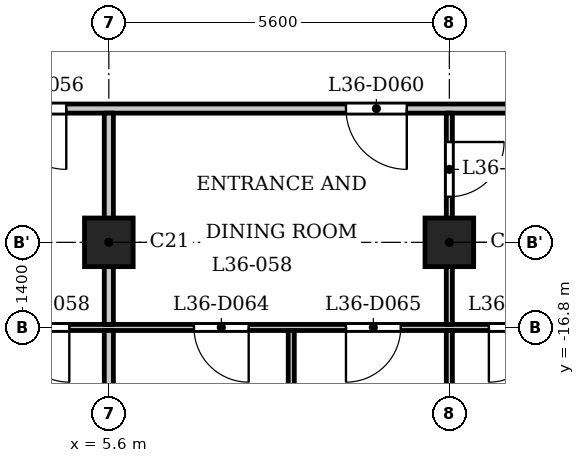
"""IFC4 building model, lengths in metres.
Left out: names, types, materials, properties, quantities, classifications, styles, units other than length and angle.
Written with IfcOpenShell. Run it as: python <this file> out.ifc"""

import sys

from ifc_helpers import new_model, si_unit, direction, frame, frame_2d, origin, origin_2d, place, context, subcontext, project, spatial, rectangle, extrude, element, fill, save


model = new_model("IFC4")
c1 = context("Model", 3, precision=1e-05, world=origin(), true_north=direction((0.0, 1.0)))
c2 = subcontext(c1, "Body", "Model", "MODEL_VIEW")
j1 = project(units=[si_unit("LENGTHUNIT", "METRE"), si_unit("PLANEANGLEUNIT", "RADIAN")], contexts=[c1])
p1 = place(None, origin())
s1 = spatial("IfcSite", under=j1, at=p1, CompositionType="ELEMENT")
p2 = place(p1, origin())
s2 = spatial("IfcBuilding", under=s1, at=p2, CompositionType="ELEMENT")
p3 = place(p2, frame((0.0, 0.0, 143.1)))
s3 = spatial("IfcBuildingStorey", under=s2, at=p3, CompositionType="ELEMENT", Elevation=143.1)
for number, where, z_axis, x_axis in (
    (1, (5.6, -15.4, 0.0), (0.0, 0.0, 1.0), (1.0, 0.0, 0.0)),
    (2, (11.2, -15.4, 0.0), (0.0, 0.0, 1.0), (1.0, 0.0, 0.0)),
):
    element("IfcColumn", number, at=place(p3, frame(where, z_axis=z_axis, x_axis=x_axis)), inside=s3, PredefinedType="COLUMN", context=c2, shape_type="SweptSolid", body=[
        extrude(rectangle(XDim=0.8, YDim=0.8, at=origin_2d()), origin(), (0.0, 0.0, 1.0), 3.5),
    ])
p4 = place(p3, frame((-16.725, -16.8, 0.0), z_axis=(0.0, 0.0, 1.0), x_axis=(1.0, 0.0, 0.0)))
e3 = element("IfcWall", 3, at=p4, inside=s3, PredefinedType="PARTITIONING", context=c2, shape_type="SweptSolid", body=[
    extrude(rectangle(XDim=33.45, YDim=0.1, at=frame_2d((16.725, 0.0))), origin(), (0.0, 0.0, 1.0), 3.2),
])
p5 = place(p4, frame((0.575, 0.0, 0.0)))
e4 = element("IfcOpeningElement", 4, at=p5, cuts=e3, PredefinedType="OPENING", context=c2, shape_type="SweptSolid", body=[
    extrude(rectangle(XDim=0.8, YDim=2.1, at=frame_2d((0.4, 1.05))), frame((0.0, 0.06, 0.0), z_axis=(0.0, -1.0, 0.0), x_axis=(1.0, 0.0, 0.0)), (0.0, 0.0, 1.0), 0.12),
])
p6 = place(p4, frame((6.175, 0.0, 0.0)))
e5 = element("IfcOpeningElement", 5, at=p6, cuts=e3, PredefinedType="OPENING", context=c2, shape_type="SweptSolid", body=[
    extrude(rectangle(XDim=0.9, YDim=2.1, at=frame_2d((0.45, 1.05))), frame((0.0, 0.06, 0.0), z_axis=(0.0, -1.0, 0.0), x_axis=(1.0, 0.0, 0.0)), (0.0, 0.0, 1.0), 0.12),
])
p7 = place(p4, frame((15.275, 0.0, 0.0)))
e6 = element("IfcOpeningElement", 6, at=p7, cuts=e3, PredefinedType="OPENING", context=c2, shape_type="SweptSolid", body=[
    extrude(rectangle(XDim=0.8, YDim=2.1, at=frame_2d((0.4, 1.05))), frame((0.0, 0.06, 0.0), z_axis=(0.0, -1.0, 0.0), x_axis=(1.0, 0.0, 0.0)), (0.0, 0.0, 1.0), 0.12),
])
p8 = place(p4, frame((11.775, 0.0, 0.0)))
e7 = element("IfcOpeningElement", 7, at=p8, cuts=e3, PredefinedType="OPENING", context=c2, shape_type="SweptSolid", body=[
    extrude(rectangle(XDim=0.9, YDim=2.1, at=frame_2d((0.45, 1.05))), frame((0.0, 0.06, 0.0), z_axis=(0.0, -1.0, 0.0), x_axis=(1.0, 0.0, 0.0)), (0.0, 0.0, 1.0), 0.12),
])
p9 = place(p4, frame((17.275, 0.0, 0.0)))
e8 = element("IfcOpeningElement", 8, at=p9, cuts=e3, PredefinedType="OPENING", context=c2, shape_type="SweptSolid", body=[
    extrude(rectangle(XDim=0.8, YDim=2.1, at=frame_2d((0.4, 1.05))), frame((0.0, 0.06, 0.0), z_axis=(0.0, -1.0, 0.0), x_axis=(1.0, 0.0, 0.0)), (0.0, 0.0, 1.0), 0.12),
])
p10 = place(p4, frame((20.775, 0.0, 0.0)))
e9 = element("IfcOpeningElement", 9, at=p10, cuts=e3, PredefinedType="OPENING", context=c2, shape_type="SweptSolid", body=[
    extrude(rectangle(XDim=0.9, YDim=2.1, at=frame_2d((0.45, 1.05))), frame((0.0, 0.06, 0.0), z_axis=(0.0, -1.0, 0.0), x_axis=(1.0, 0.0, 0.0)), (0.0, 0.0, 1.0), 0.12),
])
p11 = place(p4, frame((31.575, 0.0, 0.0)))
e10 = element("IfcOpeningElement", 10, at=p11, cuts=e3, PredefinedType="OPENING", context=c2, shape_type="SweptSolid", body=[
    extrude(rectangle(XDim=0.8, YDim=2.1, at=frame_2d((0.4, 1.05))), frame((0.0, 0.06, 0.0), z_axis=(0.0, -1.0, 0.0), x_axis=(1.0, 0.0, 0.0)), (0.0, 0.0, 1.0), 0.12),
])
p12 = place(p4, frame((28.575, 0.0, 0.0)))
e11 = element("IfcOpeningElement", 11, at=p12, cuts=e3, PredefinedType="OPENING", context=c2, shape_type="SweptSolid", body=[
    extrude(rectangle(XDim=0.9, YDim=2.1, at=frame_2d((0.45, 1.05))), frame((0.0, 0.06, 0.0), z_axis=(0.0, -1.0, 0.0), x_axis=(1.0, 0.0, 0.0)), (0.0, 0.0, 1.0), 0.12),
])
p13 = place(p4, frame((23.725, 0.0, 0.0)))
e12 = element("IfcOpeningElement", 12, at=p13, cuts=e3, PredefinedType="OPENING", context=c2, shape_type="SweptSolid", body=[
    extrude(rectangle(XDim=0.9, YDim=2.1, at=frame_2d((0.45, 1.05))), frame((0.0, 0.06, 0.0), z_axis=(0.0, -1.0, 0.0), x_axis=(1.0, 0.0, 0.0)), (0.0, 0.0, 1.0), 0.12),
])
p14 = place(p4, frame((26.225, 0.0, 0.0)))
e13 = element("IfcOpeningElement", 13, at=p14, cuts=e3, PredefinedType="OPENING", context=c2, shape_type="SweptSolid", body=[
    extrude(rectangle(XDim=0.9, YDim=2.1, at=frame_2d((0.45, 1.05))), frame((0.0, 0.06, 0.0), z_axis=(0.0, -1.0, 0.0), x_axis=(1.0, 0.0, 0.0)), (0.0, 0.0, 1.0), 0.12),
])
p15 = place(p3, frame((-17.4, -13.2, 0.0), z_axis=(0.0, 0.0, 1.0), x_axis=(1.0, 0.0, 0.0)))
e14 = element("IfcWall", 14, at=p15, inside=s3, PredefinedType="PARTITIONING", context=c2, shape_type="SweptSolid", body=[
    extrude(rectangle(XDim=34.8, YDim=0.15, at=frame_2d((17.4, 0.0))), origin(), (0.0, 0.0, 1.0), 3.2),
])
p16 = place(p15, frame((0.15, 0.0, 0.0)))
e15 = element("IfcOpeningElement", 15, at=p16, cuts=e14, PredefinedType="OPENING", context=c2, shape_type="SweptSolid", body=[
    extrude(rectangle(XDim=1.0, YDim=2.1, at=frame_2d((0.5, 1.05))), frame((0.0, 0.085, 0.0), z_axis=(0.0, -1.0, 0.0), x_axis=(1.0, 0.0, 0.0)), (0.0, 0.0, 1.0), 0.17),
])
p17 = place(p15, frame((33.55, 0.0, 0.0)))
e16 = element("IfcOpeningElement", 16, at=p17, cuts=e14, PredefinedType="OPENING", context=c2, shape_type="SweptSolid", body=[
    extrude(rectangle(XDim=1.0, YDim=2.1, at=frame_2d((0.5, 1.05))), frame((0.0, 0.085, 0.0), z_axis=(0.0, -1.0, 0.0), x_axis=(1.0, 0.0, 0.0)), (0.0, 0.0, 1.0), 0.17),
])
p18 = place(p15, frame((6.85, 0.0, 0.0)))
e17 = element("IfcOpeningElement", 17, at=p18, cuts=e14, PredefinedType="OPENING", context=c2, shape_type="SweptSolid", body=[
    extrude(rectangle(XDim=1.0, YDim=2.1, at=frame_2d((0.5, 1.05))), frame((0.0, 0.085, 0.0), z_axis=(0.0, -1.0, 0.0), x_axis=(1.0, 0.0, 0.0)), (0.0, 0.0, 1.0), 0.17),
])
p19 = place(p15, frame((12.45, 0.0, 0.0)))
e18 = element("IfcOpeningElement", 18, at=p19, cuts=e14, PredefinedType="OPENING", context=c2, shape_type="SweptSolid", body=[
    extrude(rectangle(XDim=1.0, YDim=2.1, at=frame_2d((0.5, 1.05))), frame((0.0, 0.085, 0.0), z_axis=(0.0, -1.0, 0.0), x_axis=(1.0, 0.0, 0.0)), (0.0, 0.0, 1.0), 0.17),
])
p20 = place(p15, frame((21.3, 0.0, 0.0)))
e19 = element("IfcOpeningElement", 19, at=p20, cuts=e14, PredefinedType="OPENING", context=c2, shape_type="SweptSolid", body=[
    extrude(rectangle(XDim=1.0, YDim=2.1, at=frame_2d((0.5, 1.05))), frame((0.0, 0.085, 0.0), z_axis=(0.0, -1.0, 0.0), x_axis=(1.0, 0.0, 0.0)), (0.0, 0.0, 1.0), 0.17),
])
p21 = place(p15, frame((26.9, 0.0, 0.0)))
e20 = element("IfcOpeningElement", 20, at=p21, cuts=e14, PredefinedType="OPENING", context=c2, shape_type="SweptSolid", body=[
    extrude(rectangle(XDim=1.0, YDim=2.1, at=frame_2d((0.5, 1.05))), frame((0.0, 0.085, 0.0), z_axis=(0.0, -1.0, 0.0), x_axis=(1.0, 0.0, 0.0)), (0.0, 0.0, 1.0), 0.17),
])
p22 = place(p3, frame((5.6, -22.93, 0.0), z_axis=(0.0, 0.0, 1.0), x_axis=(0.0, 1.0, 0.0)))
e21 = element("IfcWall", 21, at=p22, inside=s3, PredefinedType="PARTITIONING", context=c2, shape_type="SweptSolid", body=[
    extrude(rectangle(XDim=6.08, YDim=0.15, at=frame_2d((3.04, 0.0))), origin(), (0.0, 0.0, 1.0), 3.2),
])
p23 = place(p3, frame((5.6, -16.75, 0.0), z_axis=(0.0, 0.0, 1.0), x_axis=(0.0, 1.0, 0.0)))
e22 = element("IfcWall", 22, at=p23, inside=s3, PredefinedType="PARTITIONING", context=c2, shape_type="SweptSolid", body=[
    extrude(rectangle(XDim=3.475, YDim=0.15, at=frame_2d((1.738, 0.0))), origin(), (0.0, 0.0, 1.0), 3.2),
])
p24 = place(p3, frame((8.6, -22.08, 0.0), z_axis=(0.0, 0.0, 1.0), x_axis=(0.0, 1.0, 0.0)))
e23 = element("IfcWall", 23, at=p24, inside=s3, PredefinedType="PARTITIONING", context=c2, shape_type="SweptSolid", body=[
    extrude(rectangle(XDim=5.23, YDim=0.1, at=frame_2d((2.615, 0.0))), origin(), (0.0, 0.0, 1.0), 3.2),
])
p25 = place(p3, frame((11.2, -22.93, 0.0), z_axis=(0.0, 0.0, 1.0), x_axis=(0.0, 1.0, 0.0)))
e24 = element("IfcWall", 24, at=p25, inside=s3, PredefinedType="PARTITIONING", context=c2, shape_type="SweptSolid", body=[
    extrude(rectangle(XDim=6.08, YDim=0.1, at=frame_2d((3.04, 0.0))), origin(), (0.0, 0.0, 1.0), 3.2),
])
p26 = place(p3, frame((11.2, -16.75, 0.0), z_axis=(0.0, 0.0, 1.0), x_axis=(0.0, 1.0, 0.0)))
e25 = element("IfcWall", 25, at=p26, inside=s3, PredefinedType="PARTITIONING", context=c2, shape_type="SweptSolid", body=[
    extrude(rectangle(XDim=3.475, YDim=0.1, at=frame_2d((1.738, 0.0))), origin(), (0.0, 0.0, 1.0), 3.2),
])
p27 = place(p26, frame((2.1, 0.0, 0.0)))
e26 = element("IfcOpeningElement", 26, at=p27, cuts=e25, PredefinedType="OPENING", context=c2, shape_type="SweptSolid", body=[
    extrude(rectangle(XDim=0.9, YDim=2.1, at=frame_2d((0.45, 1.05))), frame((0.0, 0.06, 0.0), z_axis=(0.0, -1.0, 0.0), x_axis=(1.0, 0.0, 0.0)), (0.0, 0.0, 1.0), 0.12),
])
p28 = place(p20, origin())
e27 = element("IfcDoor", 27, at=p28, inside=s3, OperationType="SINGLE_SWING_RIGHT", PredefinedType="DOOR", context=c2, shape_type="SweptSolid", body=[
    extrude(rectangle(XDim=1.0, YDim=2.1, at=frame_2d((0.5, 1.05))), frame((0.0, 0.025, 0.0), z_axis=(0.0, -1.0, 0.0), x_axis=(1.0, 0.0, 0.0)), (0.0, 0.0, 1.0), 0.05),
])
fill(e19, e27)
p29 = place(p10, origin())
e28 = element("IfcDoor", 28, at=p29, inside=s3, OperationType="SINGLE_SWING_RIGHT", PredefinedType="DOOR", context=c2, shape_type="SweptSolid", body=[
    extrude(rectangle(XDim=0.9, YDim=2.1, at=frame_2d((0.45, 1.05))), frame((0.0, 0.025, 0.0), z_axis=(0.0, -1.0, 0.0), x_axis=(1.0, 0.0, 0.0)), (0.0, 0.0, 1.0), 0.05),
])
fill(e9, e28)
p30 = place(p21, origin())
e29 = element("IfcDoor", 29, at=p30, inside=s3, OperationType="SINGLE_SWING_RIGHT", PredefinedType="DOOR", context=c2, shape_type="SweptSolid", body=[
    extrude(rectangle(XDim=1.0, YDim=2.1, at=frame_2d((0.5, 1.05))), frame((0.0, 0.025, 0.0), z_axis=(0.0, -1.0, 0.0), x_axis=(1.0, 0.0, 0.0)), (0.0, 0.0, 1.0), 0.05),
])
fill(e20, e29)
p31 = place(p27, origin())
e30 = element("IfcDoor", 30, at=p31, inside=s3, OperationType="SINGLE_SWING_RIGHT", PredefinedType="DOOR", context=c2, shape_type="SweptSolid", body=[
    extrude(rectangle(XDim=0.9, YDim=2.1, at=frame_2d((0.45, 1.05))), frame((0.0, 0.025, 0.0), z_axis=(0.0, -1.0, 0.0), x_axis=(1.0, 0.0, 0.0)), (0.0, 0.0, 1.0), 0.05),
])
fill(e26, e30)
p32 = place(p12, origin())
e31 = element("IfcDoor", 31, at=p32, inside=s3, OperationType="SINGLE_SWING_LEFT", PredefinedType="DOOR", context=c2, shape_type="SweptSolid", body=[
    extrude(rectangle(XDim=0.9, YDim=2.1, at=frame_2d((0.45, 1.05))), frame((0.0, 0.025, 0.0), z_axis=(0.0, -1.0, 0.0), x_axis=(1.0, 0.0, 0.0)), (0.0, 0.0, 1.0), 0.05),
])
fill(e11, e31)
p33 = place(p13, origin())
e32 = element("IfcDoor", 32, at=p33, inside=s3, OperationType="SINGLE_SWING_RIGHT", PredefinedType="DOOR", context=c2, shape_type="SweptSolid", body=[
    extrude(rectangle(XDim=0.9, YDim=2.1, at=frame_2d((0.45, 1.05))), frame((0.0, 0.025, 0.0), z_axis=(0.0, -1.0, 0.0), x_axis=(1.0, 0.0, 0.0)), (0.0, 0.0, 1.0), 0.05),
])
fill(e12, e32)
p34 = place(p14, origin())
e33 = element("IfcDoor", 33, at=p34, inside=s3, OperationType="SINGLE_SWING_LEFT", PredefinedType="DOOR", context=c2, shape_type="SweptSolid", body=[
    extrude(rectangle(XDim=0.9, YDim=2.1, at=frame_2d((0.45, 1.05))), frame((0.0, 0.025, 0.0), z_axis=(0.0, -1.0, 0.0), x_axis=(1.0, 0.0, 0.0)), (0.0, 0.0, 1.0), 0.05),
])
fill(e13, e33)
save(model, sys.argv[1])
